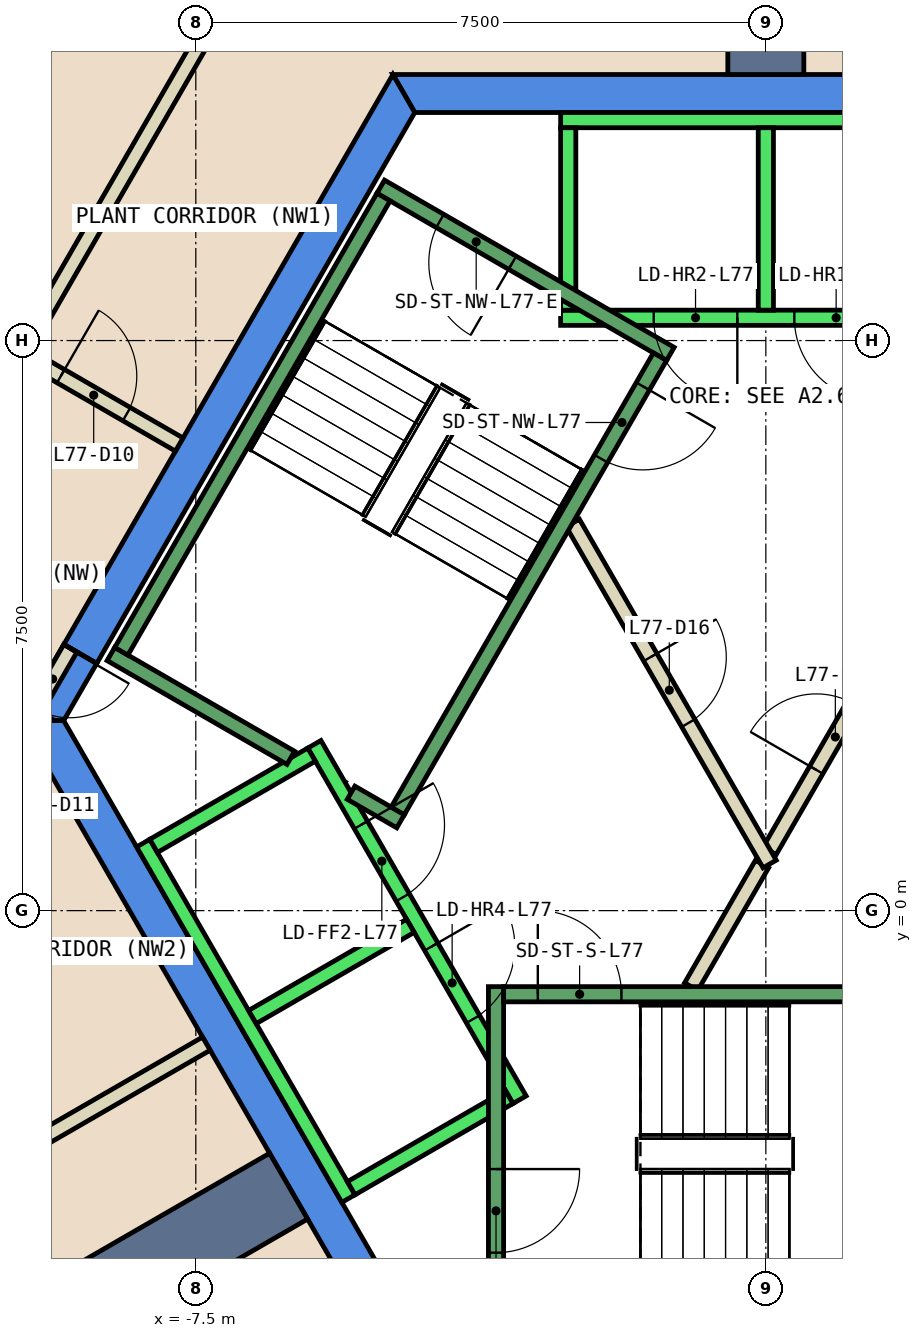
"""IFC4 building model, lengths in metres.
Left out: names, types, materials, properties, quantities, classifications, styles, units other than length and angle.
Written with IfcOpenShell. Run it as: python <this file> out.ifc"""

import sys

from ifc_helpers import new_model, si_unit, direction, frame, frame_2d, origin, place, context, subcontext, project, spatial, polyline, rectangle, outline, extrude, element, fill, save


model = new_model("IFC4")
c1 = context("Model", 3, precision=1e-05, world=origin(), true_north=direction((0.0, 1.0)))
c2 = subcontext(c1, "Body", "Model", "MODEL_VIEW")
j1 = project(units=[si_unit("LENGTHUNIT", "METRE"), si_unit("PLANEANGLEUNIT", "RADIAN")], contexts=[c1])
p1 = place(None, origin())
s1 = spatial("IfcSite", under=j1, at=p1, CompositionType="ELEMENT")
p2 = place(p1, origin())
s2 = spatial("IfcBuilding", under=s1, at=p2, CompositionType="ELEMENT")
p3 = place(p2, frame((0.0, 0.0, 326.0)))
s3 = spatial("IfcBuildingStorey", under=s2, at=p3, CompositionType="ELEMENT", Elevation=326.0)
p4 = place(p3, frame((0.0, 0.0, -0.6)))
e1 = element("IfcWall", 1, at=p4, inside=s3, PredefinedType="SHEAR", context=c2, shape_type="SweptSolid", body=[
    extrude(outline(polyline([(4.907, 11.0), (-4.907, 11.0), (-4.619, 10.5), (4.619, 10.5), (4.907, 11.0)])), origin(), (0.0, 0.0, 1.0), 5.55),
])
p5 = place(p3, frame((0.0, 0.0, -0.6)))
e2 = element("IfcWall", 2, at=p5, inside=s3, PredefinedType="SHEAR", context=c2, shape_type="SweptSolid", body=[
    extrude(outline(polyline([(-9.236, 3.502), (-8.803, 3.253), (-4.619, 10.5), (-4.907, 11.0), (-9.236, 3.502)])), origin(), (0.0, 0.0, 1.0), 5.55),
])
p6 = place(p3, frame((0.0, 0.0, 3.6)))
e3 = element("IfcWall", 3, at=p6, inside=s3, PredefinedType="SHEAR", context=c2, shape_type="SweptSolid", body=[
    extrude(outline(polyline([(-9.7, 2.7), (-9.354, 2.5), (-9.238, 2.5), (-8.803, 3.253), (-9.236, 3.502), (-9.7, 2.7)])), origin(), (0.0, 0.0, 1.0), 1.35),
])
p7 = place(p3, frame((0.0, 0.0, -0.6)))
e4 = element("IfcWall", 4, at=p7, inside=s3, PredefinedType="SHEAR", context=c2, shape_type="SweptSolid", body=[
    extrude(outline(polyline([(-9.815, 2.5), (-4.907, -6.0), (-4.619, -5.5), (-9.238, 2.5), (-9.815, 2.5)])), origin(), (0.0, 0.0, 1.0), 5.55),
])
p8 = place(p3, frame((0.0, 11.0, 0.0), z_axis=(0.0, 0.0, 1.0), x_axis=(0.0, 1.0, 0.0)))
e5 = element("IfcWall", 5, at=p8, inside=s3, PredefinedType="SHEAR", context=c2, shape_type="SweptSolid", body=[
    extrude(rectangle(XDim=13.702, YDim=1.0, at=frame_2d((6.851, 0.0))), origin(), (0.0, 0.0, 1.0), 4.95),
])
p9 = place(p3, frame((-6.279, -3.625, 0.0), z_axis=(0.0, 0.0, 1.0), x_axis=(-0.866025543801, -0.499999757484, 0.0)))
e6 = element("IfcWall", 6, at=p9, inside=s3, PredefinedType="SHEAR", context=c2, shape_type="SweptSolid", body=[
    extrude(rectangle(XDim=17.452, YDim=1.0, at=frame_2d((8.726, 0.0))), origin(), (0.0, 0.0, 1.0), 4.95),
])
p10 = place(p3, frame((-0.982, -1.0, 0.0), z_axis=(0.0, 0.0, 1.0), x_axis=(0.50024047865, 0.865886518847, 0.0)))
e7 = element("IfcWall", 7, at=p10, inside=s3, PredefinedType="PARTITIONING", context=c2, shape_type="SweptSolid", body=[
    extrude(rectangle(XDim=1.863, YDim=0.2, at=frame_2d((0.931, 0.0))), origin(), (0.0, 0.0, 1.0), 4.95),
])
p11 = place(p3, frame((0.05, 0.787, 0.0), z_axis=(0.0, 0.0, 1.0), x_axis=(0.499954076797, 0.866051915934, 0.0)))
e8 = element("IfcWall", 8, at=p11, inside=s3, PredefinedType="PARTITIONING", context=c2, shape_type="SweptSolid", body=[
    extrude(rectangle(XDim=3.558, YDim=0.2, at=frame_2d((1.779, 0.0))), origin(), (0.0, 0.0, 1.0), 4.95),
])
p12 = place(p11, frame((1.229, 0.0, 0.0)))
e9 = element("IfcOpeningElement", 9, at=p12, cuts=e8, PredefinedType="OPENING", context=c2, shape_type="SweptSolid", body=[
    extrude(rectangle(XDim=1.0, YDim=2.1, at=frame_2d((0.5, 1.05))), frame((0.0, 0.11, 0.0), z_axis=(0.0, -1.0, 0.0), x_axis=(1.0, 0.0, 0.0)), (0.0, 0.0, 1.0), 0.22),
])
p13 = place(p3, frame((-2.54, 5.1, 0.0), z_axis=(0.0, 0.0, 1.0), x_axis=(0.499925051871, -0.866068670783, 0.0)))
e10 = element("IfcWall", 10, at=p13, inside=s3, PredefinedType="PARTITIONING", context=c2, shape_type="SweptSolid", body=[
    extrude(rectangle(XDim=5.181, YDim=0.2, at=frame_2d((2.59, 0.0))), origin(), (0.0, 0.0, 1.0), 4.95),
])
p14 = place(p13, frame((2.04, 0.0, 0.0)))
e11 = element("IfcOpeningElement", 11, at=p14, cuts=e10, PredefinedType="OPENING", context=c2, shape_type="SweptSolid", body=[
    extrude(rectangle(XDim=1.0, YDim=2.1, at=frame_2d((0.5, 1.05))), frame((0.0, 0.11, 0.0), z_axis=(0.0, -1.0, 0.0), x_axis=(1.0, 0.0, 0.0)), (0.0, 0.0, 1.0), 0.22),
])
p15 = place(p3, frame((-9.796, 7.332, 0.0), z_axis=(0.0, 0.0, 1.0), x_axis=(0.865973769406, -0.500089422704, 0.0)))
e12 = element("IfcWall", 12, at=p15, inside=s3, PredefinedType="PARTITIONING", context=c2, shape_type="SweptSolid", body=[
    extrude(rectangle(XDim=2.399, YDim=0.2, at=frame_2d((1.2, 0.0))), origin(), (0.0, 0.0, 1.0), 4.95),
])
p16 = place(p15, frame((0.6, 0.0, 0.0)))
e13 = element("IfcOpeningElement", 13, at=p16, cuts=e12, PredefinedType="OPENING", context=c2, shape_type="SweptSolid", body=[
    extrude(rectangle(XDim=1.0, YDim=2.1, at=frame_2d((0.5, 1.05))), frame((0.0, 0.11, 0.0), z_axis=(0.0, -1.0, 0.0), x_axis=(1.0, 0.0, 0.0)), (0.0, 0.0, 1.0), 0.22),
])
p17 = place(p3, frame((-9.44, -2.95, 0.0), z_axis=(0.0, 0.0, 1.0), x_axis=(-0.500008478926, 0.866020508419, 0.0)))
e14 = element("IfcWall", 14, at=p17, inside=s3, PredefinedType="PARTITIONING", context=c2, shape_type="SweptSolid", body=[
    extrude(rectangle(XDim=3.522, YDim=0.2, at=frame_2d((1.761, 0.0))), origin(), (0.0, 0.0, 1.0), 4.95),
])
p18 = place(p17, frame((1.245, 0.0, 0.0)))
e15 = element("IfcOpeningElement", 15, at=p18, cuts=e14, PredefinedType="OPENING", context=c2, shape_type="SweptSolid", body=[
    extrude(rectangle(XDim=1.0, YDim=2.1, at=frame_2d((0.5, 1.05))), frame((0.0, 0.11, 0.0), z_axis=(0.0, -1.0, 0.0), x_axis=(1.0, 0.0, 0.0)), (0.0, 0.0, 1.0), 0.22),
])
p19 = place(p3, frame((-9.15, 3.452, 0.0), z_axis=(0.0, 0.0, 1.0), x_axis=(-0.500079945886, -0.865979242085, 0.0)))
e16 = element("IfcWall", 16, at=p19, inside=s3, PredefinedType="PARTITIONING", context=c2, shape_type="SweptSolid", body=[
    extrude(rectangle(XDim=0.926, YDim=0.2, at=frame_2d((0.463, 0.0))), origin(), (0.0, 0.0, 1.0), 2.4),
])
p20 = place(p19, frame((0.017, 0.0, 0.0)))
e17 = element("IfcOpeningElement", 17, at=p20, cuts=e16, PredefinedType="OPENING", context=c2, shape_type="SweptSolid", body=[
    extrude(rectangle(XDim=0.9, YDim=2.1, at=frame_2d((0.45, 1.05))), frame((0.0, 0.11, 0.0), z_axis=(0.0, -1.0, 0.0), x_axis=(1.0, 0.0, 0.0)), (0.0, 0.0, 1.0), 0.22),
])
p21 = place(p3, frame((-22.497, -10.489, 0.0), z_axis=(0.0, 0.0, 1.0), x_axis=(0.866019262169, 0.500010637439, 0.0)))
e18 = element("IfcWall", 18, at=p21, inside=s3, PredefinedType="PARTITIONING", context=c2, shape_type="SweptSolid", body=[
    extrude(rectangle(XDim=17.478, YDim=0.2, at=frame_2d((8.739, 0.0))), origin(), (0.0, 0.0, 1.0), 4.95),
])
p22 = place(p3, frame((-7.444, 11.407, 0.0), z_axis=(0.0, 0.0, 1.0), x_axis=(-0.499919806806, -0.866071698396, 0.0)))
e19 = element("IfcWall", 19, at=p22, inside=s3, PredefinedType="PARTITIONING", context=c2, shape_type="SweptSolid", body=[
    extrude(rectangle(XDim=4.605, YDim=0.2, at=frame_2d((2.302, 0.0))), origin(), (0.0, 0.0, 1.0), 4.95),
])
p23 = place(p3, frame((2.7, 7.8, 0.0), z_axis=(0.0, 0.0, 1.0), x_axis=(-1.0, 0.0, 0.0)))
e20 = element("IfcWall", 20, at=p23, inside=s3, PredefinedType="STANDARD", context=c2, shape_type="SweptSolid", body=[
    extrude(rectangle(XDim=5.4, YDim=0.2, at=frame_2d((2.7, 0.0))), origin(), (0.0, 0.0, 1.0), 4.95),
])
p24 = place(p23, frame((1.225, 0.0, 0.0)))
e21 = element("IfcOpeningElement", 21, at=p24, cuts=e20, PredefinedType="OPENING", context=c2, shape_type="SweptSolid", body=[
    extrude(rectangle(XDim=1.1, YDim=2.1, at=frame_2d((0.55, 1.05))), frame((0.0, 0.11, 0.0), z_axis=(0.0, -1.0, 0.0), x_axis=(1.0, 0.0, 0.0)), (0.0, 0.0, 1.0), 0.22),
])
p25 = place(p23, frame((3.075, 0.0, 0.0)))
e22 = element("IfcOpeningElement", 22, at=p25, cuts=e20, PredefinedType="OPENING", context=c2, shape_type="SweptSolid", body=[
    extrude(rectangle(XDim=1.1, YDim=2.1, at=frame_2d((0.55, 1.05))), frame((0.0, 0.11, 0.0), z_axis=(0.0, -1.0, 0.0), x_axis=(1.0, 0.0, 0.0)), (0.0, 0.0, 1.0), 0.22),
])
p26 = place(p3, frame((2.7, 10.4, 0.0), z_axis=(0.0, 0.0, 1.0), x_axis=(-1.0, 0.0, 0.0)))
e23 = element("IfcWall", 23, at=p26, inside=s3, PredefinedType="STANDARD", context=c2, shape_type="SweptSolid", body=[
    extrude(rectangle(XDim=5.4, YDim=0.2, at=frame_2d((2.7, 0.0))), origin(), (0.0, 0.0, 1.0), 4.95),
])
for number, where, z_axis, x_axis in (
    (24, (0.0, 7.9, 0.0), (0.0, 0.0, 1.0), (0.0, 1.0, 0.0)),
    (25, (-2.6, 7.9, 0.0), (0.0, 0.0, 1.0), (0.0, 1.0, 0.0)),
):
    element("IfcWall", number, at=place(p3, frame(where, z_axis=z_axis, x_axis=x_axis)), inside=s3, PredefinedType="STANDARD", context=c2, shape_type="SweptSolid", body=[
        extrude(rectangle(XDim=2.4, YDim=0.2, at=frame_2d((1.2, 0.0))), origin(), (0.0, 0.0, 1.0), 4.95),
    ])
p27 = place(p3, frame((-5.94, 2.188, 0.0), z_axis=(0.0, 0.0, 1.0), x_axis=(0.500034260056, -0.866005622828, 0.0)))
e26 = element("IfcWall", 26, at=p27, inside=s3, PredefinedType="STANDARD", context=c2, shape_type="SweptSolid", body=[
    extrude(rectangle(XDim=5.399, YDim=0.2, at=frame_2d((2.7, 0.0))), origin(), (0.0, 0.0, 1.0), 4.95),
])
p28 = place(p27, frame((3.075, 0.0, 0.0)))
e27 = element("IfcOpeningElement", 27, at=p28, cuts=e26, PredefinedType="OPENING", context=c2, shape_type="SweptSolid", body=[
    extrude(rectangle(XDim=1.1, YDim=2.1, at=frame_2d((0.55, 1.05))), frame((0.0, 0.11, 0.0), z_axis=(0.0, -1.0, 0.0), x_axis=(1.0, 0.0, 0.0)), (0.0, 0.0, 1.0), 0.22),
])
p29 = place(p27, frame((1.225, 0.0, 0.0)))
e28 = element("IfcOpeningElement", 28, at=p29, cuts=e26, PredefinedType="OPENING", context=c2, shape_type="SweptSolid", body=[
    extrude(rectangle(XDim=1.1, YDim=2.1, at=frame_2d((0.55, 1.05))), frame((0.0, 0.11, 0.0), z_axis=(0.0, -1.0, 0.0), x_axis=(1.0, 0.0, 0.0)), (0.0, 0.0, 1.0), 0.22),
])
p30 = place(p3, frame((-8.192, 0.888, 0.0), z_axis=(0.0, 0.0, 1.0), x_axis=(0.500034260056, -0.866005622828, 0.0)))
e29 = element("IfcWall", 29, at=p30, inside=s3, PredefinedType="STANDARD", context=c2, shape_type="SweptSolid", body=[
    extrude(rectangle(XDim=5.399, YDim=0.2, at=frame_2d((2.7, 0.0))), origin(), (0.0, 0.0, 1.0), 4.95),
])
for number, where, z_axis, x_axis in (
    (30, (-5.977, 2.052, 0.0), (0.0, 0.0, 1.0), (-0.866, -0.5, 0.0)),
    (31, (-4.677, -0.2, 0.0), (0.0, 0.0, 1.0), (-0.866, -0.5, 0.0)),
):
    element("IfcWall", number, at=place(p3, frame(where, z_axis=z_axis, x_axis=x_axis)), inside=s3, PredefinedType="STANDARD", context=c2, shape_type="SweptSolid", body=[
        extrude(rectangle(XDim=2.399, YDim=0.2, at=frame_2d((1.2, 0.0))), origin(), (0.0, 0.0, 1.0), 4.95),
    ])
p31 = place(p3, frame((-3.377, -2.452, 0.0), z_axis=(0.0, 0.0, 1.0), x_axis=(-0.865955154139, -0.50012165622, 0.0)))
e32 = element("IfcWall", 32, at=p31, inside=s3, PredefinedType="STANDARD", context=c2, shape_type="SweptSolid", body=[
    extrude(rectangle(XDim=2.4, YDim=0.2, at=frame_2d((1.2, 0.0))), origin(), (0.0, 0.0, 1.0), 4.95),
])
p32 = place(p3, frame((-3.55, -1.0, 0.0), z_axis=(0.0, 0.0, 1.0), x_axis=(0.0, -1.0, 0.0)))
e33 = element("IfcWall", 33, at=p32, inside=s3, PredefinedType="STANDARD", context=c2, shape_type="SweptSolid", body=[
    extrude(rectangle(XDim=4.4, YDim=0.2, at=frame_2d((2.2, 0.0))), origin(), (0.0, 0.0, 1.0), 4.95),
])
p33 = place(p32, frame((2.4, 0.0, 0.0)))
e34 = element("IfcOpeningElement", 34, at=p33, cuts=e33, PredefinedType="OPENING", context=c2, shape_type="SweptSolid", body=[
    extrude(rectangle(XDim=1.1, YDim=2.2, at=frame_2d((0.55, 1.1))), frame((0.0, 0.11, 0.0), z_axis=(0.0, -1.0, 0.0), x_axis=(1.0, 0.0, 0.0)), (0.0, 0.0, 1.0), 0.22),
])
p34 = place(p3, frame((-3.45, -1.1, 0.0), z_axis=(0.0, 0.0, 1.0), x_axis=(1.0, 0.0, 0.0)))
e35 = element("IfcWall", 35, at=p34, inside=s3, PredefinedType="STANDARD", context=c2, shape_type="SweptSolid", body=[
    extrude(rectangle(XDim=6.9, YDim=0.2, at=frame_2d((3.45, 0.0))), origin(), (0.0, 0.0, 1.0), 4.95),
])
p35 = place(p34, frame((0.45, 0.0, 0.0)))
e36 = element("IfcOpeningElement", 36, at=p35, cuts=e35, PredefinedType="OPENING", context=c2, shape_type="SweptSolid", body=[
    extrude(rectangle(XDim=1.1, YDim=2.2, at=frame_2d((0.55, 1.1))), frame((0.0, 0.11, 0.0), z_axis=(0.0, -1.0, 0.0), x_axis=(1.0, 0.0, 0.0)), (0.0, 0.0, 1.0), 0.22),
])
p36 = place(p3, frame((-1.256, 7.324, 0.0), z_axis=(0.0, 0.0, 1.0), x_axis=(-0.866046073146, 0.499964197906, 0.0)))
e37 = element("IfcWall", 37, at=p36, inside=s3, PredefinedType="STANDARD", context=c2, shape_type="SweptSolid", body=[
    extrude(rectangle(XDim=4.4, YDim=0.2, at=frame_2d((2.2, 0.0))), origin(), (0.0, 0.0, 1.0), 4.95),
])
p37 = place(p36, frame((2.4, 0.0, 0.0)))
e38 = element("IfcOpeningElement", 38, at=p37, cuts=e37, PredefinedType="OPENING", context=c2, shape_type="SweptSolid", body=[
    extrude(rectangle(XDim=1.1, YDim=2.2, at=frame_2d((0.55, 1.1))), frame((0.0, 0.11, 0.0), z_axis=(0.0, -1.0, 0.0), x_axis=(1.0, 0.0, 0.0)), (0.0, 0.0, 1.0), 0.22),
])
p38 = place(p3, frame((-6.25, 2.01, 0.0), z_axis=(0.0, 0.0, 1.0), x_axis=(-0.86611865017, 0.499838457731, 0.0)))
e39 = element("IfcWall", 39, at=p38, inside=s3, PredefinedType="STANDARD", context=c2, shape_type="SweptSolid", body=[
    extrude(rectangle(XDim=2.733, YDim=0.2, at=frame_2d((1.366, 0.0))), origin(), (0.0, 0.0, 1.0), 4.95),
])
p39 = place(p3, frame((-4.806, 1.176, 0.0), z_axis=(0.0, 0.0, 1.0), x_axis=(-0.866558586415, 0.499075361355, 0.0)))
e40 = element("IfcWall", 40, at=p39, inside=s3, PredefinedType="STANDARD", context=c2, shape_type="SweptSolid", body=[
    extrude(rectangle(XDim=0.751, YDim=0.2, at=frame_2d((0.376, 0.0))), origin(), (0.0, 0.0, 1.0), 4.95),
])
p40 = place(p3, frame((-1.393, 7.288, 0.0), z_axis=(0.0, 0.0, 1.0), x_axis=(-0.499963383562, -0.866046543262, 0.0)))
e41 = element("IfcWall", 41, at=p40, inside=s3, PredefinedType="STANDARD", context=c2, shape_type="SweptSolid", body=[
    extrude(rectangle(XDim=6.9, YDim=0.2, at=frame_2d((3.45, 0.0))), origin(), (0.0, 0.0, 1.0), 4.95),
])
p41 = place(p40, frame((0.45, 0.0, 0.0)))
e42 = element("IfcOpeningElement", 42, at=p41, cuts=e41, PredefinedType="OPENING", context=c2, shape_type="SweptSolid", body=[
    extrude(rectangle(XDim=1.1, YDim=2.2, at=frame_2d((0.55, 1.1))), frame((0.0, 0.11, 0.0), z_axis=(0.0, -1.0, 0.0), x_axis=(1.0, 0.0, 0.0)), (0.0, 0.0, 1.0), 0.22),
])
p42 = place(p3, frame((-5.03, 9.388, 0.0), z_axis=(0.0, 0.0, 1.0), x_axis=(-0.499978703459, -0.866037698999, 0.0)))
e43 = element("IfcWall", 43, at=p42, inside=s3, PredefinedType="STANDARD", context=c2, shape_type="SweptSolid", body=[
    extrude(rectangle(XDim=6.9, YDim=0.2, at=frame_2d((3.45, 0.0))), origin(), (0.0, 0.0, 1.0), 4.95),
])
p43 = place(p16, origin())
e44 = element("IfcDoor", 44, at=p43, inside=s3, OperationType="SINGLE_SWING_LEFT", PredefinedType="DOOR", context=c2, shape_type="SweptSolid", body=[
    extrude(rectangle(XDim=1.0, YDim=2.1, at=frame_2d((0.5, 1.05))), frame((0.0, 0.025, 0.0), z_axis=(0.0, -1.0, 0.0), x_axis=(1.0, 0.0, 0.0)), (0.0, 0.0, 1.0), 0.05),
])
fill(e13, e44)
p44 = place(p12, origin())
e45 = element("IfcDoor", 45, at=p44, inside=s3, OperationType="SINGLE_SWING_RIGHT", PredefinedType="DOOR", context=c2, shape_type="SweptSolid", body=[
    extrude(rectangle(XDim=1.0, YDim=2.1, at=frame_2d((0.5, 1.05))), frame((0.0, 0.025, 0.0), z_axis=(0.0, -1.0, 0.0), x_axis=(1.0, 0.0, 0.0)), (0.0, 0.0, 1.0), 0.05),
])
fill(e9, e45)
p45 = place(p14, origin())
e46 = element("IfcDoor", 46, at=p45, inside=s3, OperationType="SINGLE_SWING_RIGHT", PredefinedType="DOOR", context=c2, shape_type="SweptSolid", body=[
    extrude(rectangle(XDim=1.0, YDim=2.1, at=frame_2d((0.5, 1.05))), frame((0.0, 0.025, 0.0), z_axis=(0.0, -1.0, 0.0), x_axis=(1.0, 0.0, 0.0)), (0.0, 0.0, 1.0), 0.05),
])
fill(e11, e46)
p46 = place(p20, origin())
e47 = element("IfcDoor", 47, at=p46, inside=s3, OperationType="SINGLE_SWING_LEFT", PredefinedType="DOOR", context=c2, shape_type="SweptSolid", body=[
    extrude(rectangle(XDim=0.9, YDim=2.1, at=frame_2d((0.45, 1.05))), frame((0.0, 0.025, 0.0), z_axis=(0.0, -1.0, 0.0), x_axis=(1.0, 0.0, 0.0)), (0.0, 0.0, 1.0), 0.05),
])
fill(e17, e47)
p47 = place(p24, origin())
e48 = element("IfcDoor", 48, at=p47, inside=s3, OperationType="SLIDING_TO_LEFT", PredefinedType="DOOR", context=c2, shape_type="SweptSolid", body=[
    extrude(rectangle(XDim=1.1, YDim=2.1, at=frame_2d((0.55, 1.05))), frame((0.0, 0.025, 0.0), z_axis=(0.0, -1.0, 0.0), x_axis=(1.0, 0.0, 0.0)), (0.0, 0.0, 1.0), 0.05),
])
fill(e21, e48)
p48 = place(p25, origin())
e49 = element("IfcDoor", 49, at=p48, inside=s3, OperationType="SLIDING_TO_LEFT", PredefinedType="DOOR", context=c2, shape_type="SweptSolid", body=[
    extrude(rectangle(XDim=1.1, YDim=2.1, at=frame_2d((0.55, 1.05))), frame((0.0, 0.025, 0.0), z_axis=(0.0, -1.0, 0.0), x_axis=(1.0, 0.0, 0.0)), (0.0, 0.0, 1.0), 0.05),
])
fill(e22, e49)
p49 = place(p28, origin())
e50 = element("IfcDoor", 50, at=p49, inside=s3, OperationType="SLIDING_TO_LEFT", PredefinedType="DOOR", context=c2, shape_type="SweptSolid", body=[
    extrude(rectangle(XDim=1.1, YDim=2.1, at=frame_2d((0.55, 1.05))), frame((0.0, 0.025, 0.0), z_axis=(0.0, -1.0, 0.0), x_axis=(1.0, 0.0, 0.0)), (0.0, 0.0, 1.0), 0.05),
])
fill(e27, e50)
p50 = place(p29, origin())
e51 = element("IfcDoor", 51, at=p50, inside=s3, OperationType="SLIDING_TO_LEFT", PredefinedType="DOOR", context=c2, shape_type="SweptSolid", body=[
    extrude(rectangle(XDim=1.1, YDim=2.1, at=frame_2d((0.55, 1.05))), frame((0.0, 0.025, 0.0), z_axis=(0.0, -1.0, 0.0), x_axis=(1.0, 0.0, 0.0)), (0.0, 0.0, 1.0), 0.05),
])
fill(e28, e51)
p51 = place(p35, origin())
e52 = element("IfcDoor", 52, at=p51, inside=s3, OperationType="SINGLE_SWING_LEFT", PredefinedType="DOOR", context=c2, shape_type="SweptSolid", body=[
    extrude(rectangle(XDim=1.1, YDim=2.2, at=frame_2d((0.55, 1.1))), frame((0.0, 0.025, 0.0), z_axis=(0.0, -1.0, 0.0), x_axis=(1.0, 0.0, 0.0)), (0.0, 0.0, 1.0), 0.05),
])
fill(e36, e52)
p52 = place(p33, origin())
e53 = element("IfcDoor", 53, at=p52, inside=s3, OperationType="SINGLE_SWING_LEFT", PredefinedType="DOOR", context=c2, shape_type="SweptSolid", body=[
    extrude(rectangle(XDim=1.1, YDim=2.2, at=frame_2d((0.55, 1.1))), frame((0.0, 0.025, 0.0), z_axis=(0.0, -1.0, 0.0), x_axis=(1.0, 0.0, 0.0)), (0.0, 0.0, 1.0), 0.05),
])
fill(e34, e53)
p53 = place(p41, origin())
e54 = element("IfcDoor", 54, at=p53, inside=s3, OperationType="SINGLE_SWING_LEFT", PredefinedType="DOOR", context=c2, shape_type="SweptSolid", body=[
    extrude(rectangle(XDim=1.1, YDim=2.2, at=frame_2d((0.55, 1.1))), frame((0.0, 0.025, 0.0), z_axis=(0.0, -1.0, 0.0), x_axis=(1.0, 0.0, 0.0)), (0.0, 0.0, 1.0), 0.05),
])
fill(e42, e54)
p54 = place(p37, origin())
e55 = element("IfcDoor", 55, at=p54, inside=s3, OperationType="SINGLE_SWING_LEFT", PredefinedType="DOOR", context=c2, shape_type="SweptSolid", body=[
    extrude(rectangle(XDim=1.1, YDim=2.2, at=frame_2d((0.55, 1.1))), frame((0.0, 0.025, 0.0), z_axis=(0.0, -1.0, 0.0), x_axis=(1.0, 0.0, 0.0)), (0.0, 0.0, 1.0), 0.05),
])
fill(e38, e55)
save(model, sys.argv[1])
